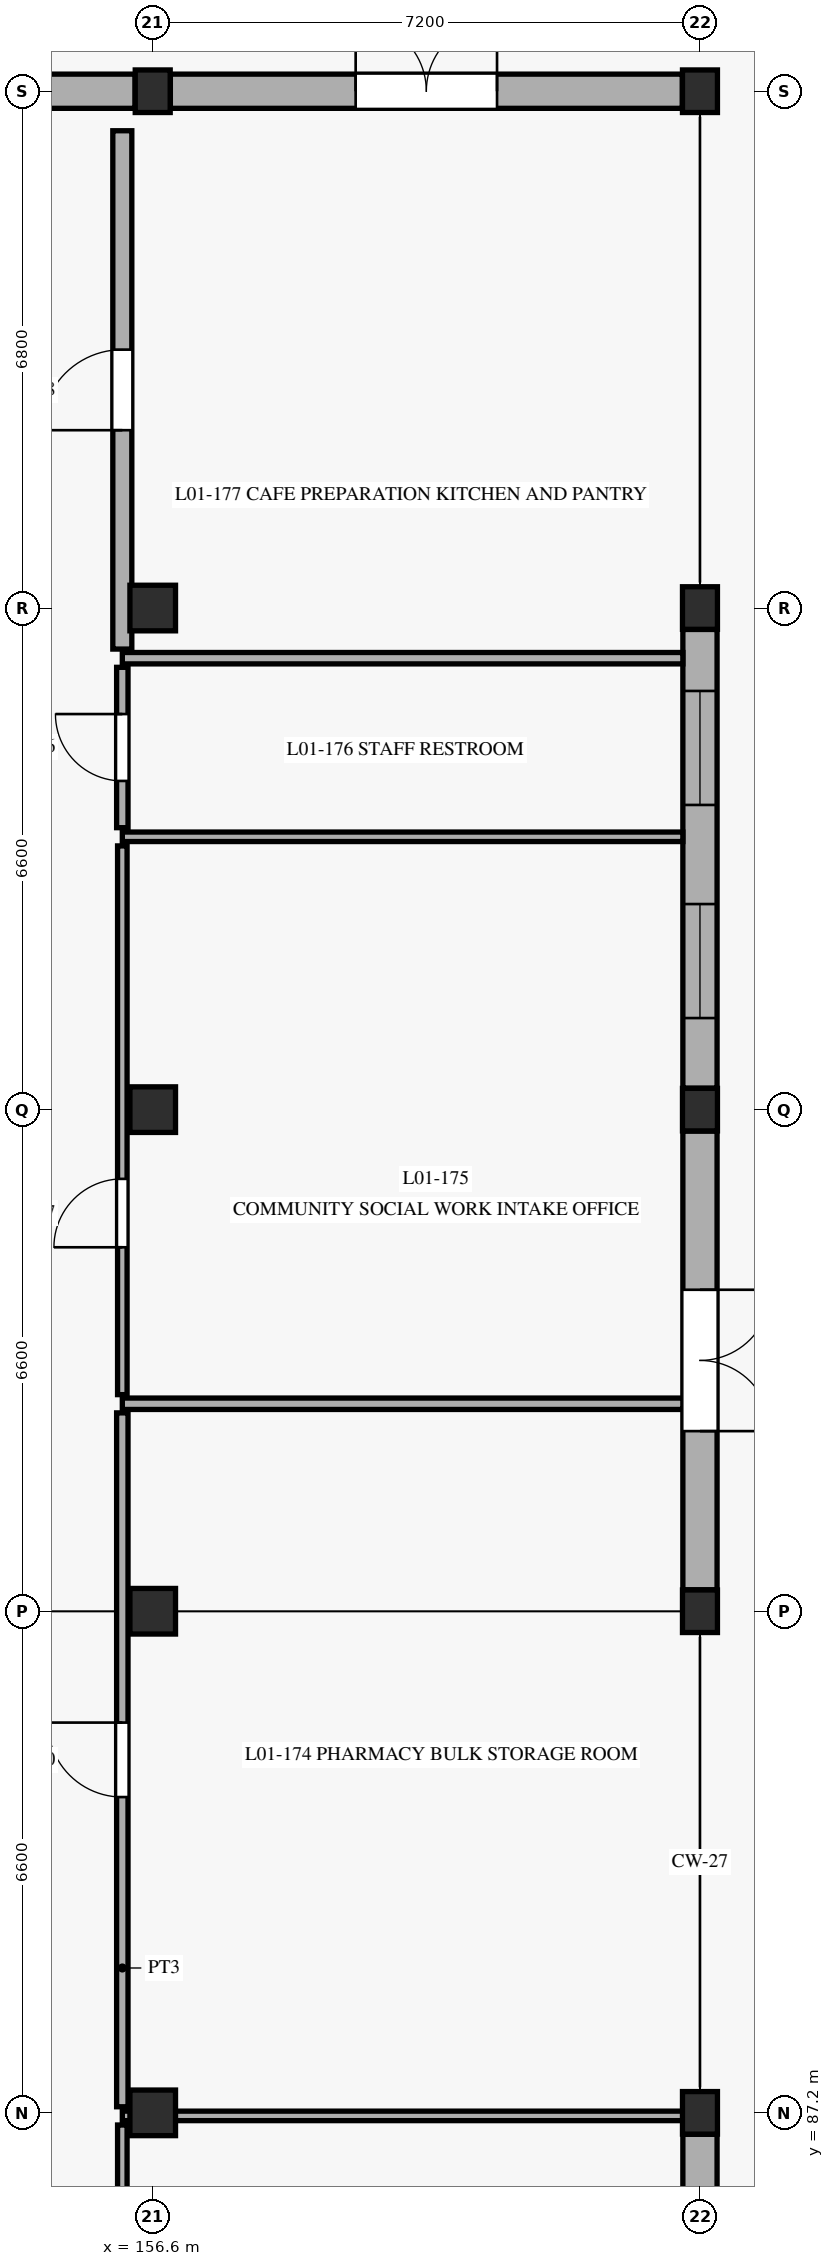
"""IFC4 building model, lengths in metres.
Left out: names, types, materials, properties, quantities, classifications, styles, units other than length and angle.
Written with IfcOpenShell. Run it as: python <this file> out.ifc"""

import sys

from ifc_helpers import new_model, si_unit, direction, frame, frame_2d, origin, origin_with_axes, origin_2d, place, context, subcontext, project, spatial, rectangle, extrude, element, fill, save


model = new_model("IFC4")
c1 = context("Model", 3, precision=1e-05, world=origin(), true_north=direction((0.0, 1.0)))
c2 = subcontext(c1, "Body", "Model", "MODEL_VIEW")
j1 = project(units=[si_unit("LENGTHUNIT", "METRE"), si_unit("PLANEANGLEUNIT", "RADIAN")], contexts=[c1])
p1 = place(None, origin())
s1 = spatial("IfcSite", under=j1, at=p1, CompositionType="ELEMENT")
p2 = place(p1, origin())
s2 = spatial("IfcBuilding", under=s1, at=p2, CompositionType="ELEMENT")
p3 = place(p2, origin())
s3 = spatial("IfcBuildingStorey", under=s2, at=p3, CompositionType="ELEMENT", Elevation=0.0)
for number, where, z_axis, x_axis in (
    (1, (156.6, 87.2, 0.0), (0.0, 0.0, 1.0), (1.0, 0.0, 0.0)),
    (2, (156.6, 93.8, 0.0), (0.0, 0.0, 1.0), (1.0, 0.0, 0.0)),
    (3, (156.6, 100.4, 0.0), (0.0, 0.0, 1.0), (1.0, 0.0, 0.0)),
    (4, (156.6, 107.0, 0.0), (0.0, 0.0, 1.0), (1.0, 0.0, 0.0)),
):
    element("IfcColumn", number, at=place(p3, frame(where, z_axis=z_axis, x_axis=x_axis)), inside=s3, PredefinedType="COLUMN", context=c2, shape_type="SweptSolid", body=[
        extrude(rectangle(XDim=0.6, YDim=0.6, at=origin_2d()), origin(), (0.0, 0.0, 1.0), 4.8),
    ])
for number, where, z_axis, x_axis in (
    (5, (156.6, 113.8, 0.0), (0.0, 0.0, 1.0), (1.0, 0.0, 0.0)),
    (6, (163.8, 87.2, 0.0), (0.0, 0.0, 1.0), (1.0, 0.0, 0.0)),
    (7, (163.8, 93.8, 0.0), (0.0, 0.0, 1.0), (1.0, 0.0, 0.0)),
    (8, (163.8, 100.4, 0.0), (0.0, 0.0, 1.0), (1.0, 0.0, 0.0)),
    (9, (163.8, 107.0, 0.0), (0.0, 0.0, 1.0), (1.0, 0.0, 0.0)),
    (10, (163.8, 113.8, 0.0), (0.0, 0.0, 1.0), (1.0, 0.0, 0.0)),
):
    element("IfcColumn", number, at=place(p3, frame(where, z_axis=z_axis, x_axis=x_axis)), inside=s3, PredefinedType="COLUMN", context=c2, shape_type="SweptSolid", body=[
        extrude(rectangle(XDim=0.46, YDim=0.56, at=origin_2d()), origin(), (0.0, 0.0, 1.0), 4.8),
    ])
p4 = place(p3, frame((163.8, 80.882, 0.0), z_axis=(0.0, 0.0, 1.0), x_axis=(0.0, 1.0, 0.0)))
e11 = element("IfcWall", 11, at=p4, inside=s3, PredefinedType="SOLIDWALL", context=c2, shape_type="SweptSolid", body=[
    extrude(rectangle(XDim=6.036, YDim=0.45, at=frame_2d((3.018, 0.0))), origin(), (0.0, 0.0, 1.0), 3.95),
])
p5 = place(p4, frame((1.262, 0.0, 0.65)))
e12 = element("IfcOpeningElement", 12, at=p5, cuts=e11, PredefinedType="OPENING", context=c2, shape_type="SweptSolid", body=[
    extrude(rectangle(XDim=1.5, YDim=2.2, at=frame_2d((0.75, 1.1))), frame((0.0, 0.235, 0.0), z_axis=(0.0, -1.0, 0.0), x_axis=(1.0, 0.0, 0.0)), (0.0, 0.0, 1.0), 0.47),
])
p6 = place(p4, frame((3.274, 0.0, 0.65)))
e13 = element("IfcOpeningElement", 13, at=p6, cuts=e11, PredefinedType="OPENING", context=c2, shape_type="SweptSolid", body=[
    extrude(rectangle(XDim=1.5, YDim=2.2, at=frame_2d((0.75, 1.1))), frame((0.0, 0.235, 0.0), z_axis=(0.0, -1.0, 0.0), x_axis=(1.0, 0.0, 0.0)), (0.0, 0.0, 1.0), 0.47),
])
p7 = place(p3, frame((163.8, 94.082, 0.0), z_axis=(0.0, 0.0, 1.0), x_axis=(0.0, 1.0, 0.0)))
e14 = element("IfcWall", 14, at=p7, inside=s3, PredefinedType="SOLIDWALL", context=c2, shape_type="SweptSolid", body=[
    extrude(rectangle(XDim=6.036, YDim=0.45, at=frame_2d((3.018, 0.0))), origin(), (0.0, 0.0, 1.0), 3.95),
])
p8 = place(p7, frame((2.088, 0.0, 0.0)))
e15 = element("IfcOpeningElement", 15, at=p8, cuts=e14, PredefinedType="OPENING", context=c2, shape_type="SweptSolid", body=[
    extrude(rectangle(XDim=1.86, YDim=2.5, at=frame_2d((0.93, 1.25))), frame((0.0, 0.235, 0.0), z_axis=(0.0, -1.0, 0.0), x_axis=(1.0, 0.0, 0.0)), (0.0, 0.0, 1.0), 0.47),
])
p9 = place(p3, frame((163.8, 100.682, 0.0), z_axis=(0.0, 0.0, 1.0), x_axis=(0.0, 1.0, 0.0)))
e16 = element("IfcWall", 16, at=p9, inside=s3, PredefinedType="SOLIDWALL", context=c2, shape_type="SweptSolid", body=[
    extrude(rectangle(XDim=6.036, YDim=0.45, at=frame_2d((3.018, 0.0))), origin(), (0.0, 0.0, 1.0), 3.95),
])
p10 = place(p9, frame((0.923, 0.0, 0.65)))
e17 = element("IfcOpeningElement", 17, at=p10, cuts=e16, PredefinedType="OPENING", context=c2, shape_type="SweptSolid", body=[
    extrude(rectangle(XDim=1.5, YDim=2.2, at=frame_2d((0.75, 1.1))), frame((0.0, 0.235, 0.0), z_axis=(0.0, -1.0, 0.0), x_axis=(1.0, 0.0, 0.0)), (0.0, 0.0, 1.0), 0.47),
])
p11 = place(p9, frame((3.727, 0.0, 0.65)))
e18 = element("IfcOpeningElement", 18, at=p11, cuts=e16, PredefinedType="OPENING", context=c2, shape_type="SweptSolid", body=[
    extrude(rectangle(XDim=1.5, YDim=2.2, at=frame_2d((0.75, 1.1))), frame((0.0, 0.235, 0.0), z_axis=(0.0, -1.0, 0.0), x_axis=(1.0, 0.0, 0.0)), (0.0, 0.0, 1.0), 0.47),
])
p12 = place(p3, frame((163.568, 113.8, 0.0), z_axis=(0.0, 0.0, 1.0), x_axis=(-1.0, 0.0, 0.0)))
e19 = element("IfcWall", 19, at=p12, inside=s3, PredefinedType="SOLIDWALL", context=c2, shape_type="SweptSolid", body=[
    extrude(rectangle(XDim=6.736, YDim=0.45, at=frame_2d((3.368, 0.0))), origin(), (0.0, 0.0, 1.0), 4.0),
])
p13 = place(p12, frame((2.438, 0.0, 0.0)))
e20 = element("IfcOpeningElement", 20, at=p13, cuts=e19, PredefinedType="OPENING", context=c2, shape_type="SweptSolid", body=[
    extrude(rectangle(XDim=1.86, YDim=2.5, at=frame_2d((0.93, 1.25))), frame((0.0, 0.235, 0.0), z_axis=(0.0, -1.0, 0.0), x_axis=(1.0, 0.0, 0.0)), (0.0, 0.0, 1.0), 0.47),
])
p14 = place(p3, frame((156.368, 113.8, 0.0), z_axis=(0.0, 0.0, 1.0), x_axis=(-1.0, 0.0, 0.0)))
e21 = element("IfcWall", 21, at=p14, inside=s3, PredefinedType="SOLIDWALL", context=c2, shape_type="SweptSolid", body=[
    extrude(rectangle(XDim=7.336, YDim=0.45, at=frame_2d((3.668, 0.0))), origin(), (0.0, 0.0, 1.0), 4.0),
])
p15 = place(p14, frame((2.568, 0.0, 0.9)))
e22 = element("IfcOpeningElement", 22, at=p15, cuts=e21, PredefinedType="OPENING", context=c2, shape_type="SweptSolid", body=[
    extrude(rectangle(XDim=2.2, YDim=1.1, at=frame_2d((1.1, 0.55))), frame((0.0, 0.235, 0.0), z_axis=(0.0, -1.0, 0.0), x_axis=(1.0, 0.0, 0.0)), (0.0, 0.0, 1.0), 0.47),
])
p16 = place(p3, frame((156.2, 78.79, 0.0), z_axis=(0.0, 0.0, 1.0), x_axis=(0.0, 1.0, 0.0)))
e23 = element("IfcWall", 23, at=p16, inside=s3, PredefinedType="PARTITIONING", context=c2, shape_type="SweptSolid", body=[
    extrude(rectangle(XDim=8.25, YDim=0.125, at=frame_2d((4.125, 0.0))), origin(), (0.0, 0.0, 1.0), 4.095),
])
p17 = place(p16, frame((3.439, 0.0, 0.0)))
e24 = element("IfcOpeningElement", 24, at=p17, cuts=e23, PredefinedType="OPENING", context=c2, shape_type="SweptSolid", body=[
    extrude(rectangle(XDim=1.22, YDim=2.2, at=frame_2d((0.61, 1.1))), frame((0.0, 0.073, 0.0), z_axis=(0.0, -1.0, 0.0), x_axis=(1.0, 0.0, 0.0)), (0.0, 0.0, 1.0), 0.145),
])
p18 = place(p3, frame((156.2, 87.16, 0.0), z_axis=(0.0, 0.0, 1.0), x_axis=(1.0, 0.0, 0.0)))
e25 = element("IfcWall", 25, at=p18, inside=s3, PredefinedType="PARTITIONING", context=c2, shape_type="SweptSolid", body=[
    extrude(rectangle(XDim=7.375, YDim=0.125, at=frame_2d((3.688, 0.0))), origin(), (0.0, 0.0, 1.0), 4.095),
])
p19 = place(p3, frame((156.2, 87.28, 0.0), z_axis=(0.0, 0.0, 1.0), x_axis=(0.0, 1.0, 0.0)))
e26 = element("IfcWall", 26, at=p19, inside=s3, PredefinedType="PARTITIONING", context=c2, shape_type="SweptSolid", body=[
    extrude(rectangle(XDim=9.13, YDim=0.15, at=frame_2d((4.565, 0.0))), origin(), (0.0, 0.0, 1.0), 4.095),
])
p20 = place(p19, frame((4.075, 0.0, 0.0)))
e27 = element("IfcOpeningElement", 27, at=p20, cuts=e26, PredefinedType="OPENING", context=c2, shape_type="SweptSolid", body=[
    extrude(rectangle(XDim=0.98, YDim=2.12, at=frame_2d((0.49, 1.06))), frame((0.0, 0.085, 0.0), z_axis=(0.0, -1.0, 0.0), x_axis=(1.0, 0.0, 0.0)), (0.0, 0.0, 1.0), 0.17),
])
p21 = place(p3, frame((156.2, 96.53, 0.0), z_axis=(0.0, 0.0, 1.0), x_axis=(1.0, 0.0, 0.0)))
e28 = element("IfcWall", 28, at=p21, inside=s3, PredefinedType="PARTITIONING", context=c2, shape_type="SweptSolid", body=[
    extrude(rectangle(XDim=7.375, YDim=0.15, at=frame_2d((3.688, 0.0))), origin(), (0.0, 0.0, 1.0), 3.945),
])
p22 = place(p3, frame((156.2, 96.65, 0.0), z_axis=(0.0, 0.0, 1.0), x_axis=(0.0, 1.0, 0.0)))
e29 = element("IfcWall", 29, at=p22, inside=s3, PredefinedType="PARTITIONING", context=c2, shape_type="SweptSolid", body=[
    extrude(rectangle(XDim=7.22, YDim=0.125, at=frame_2d((3.61, 0.0))), origin(), (0.0, 0.0, 1.0), 4.095),
])
p23 = place(p22, frame((1.939, 0.0, 0.0)))
e30 = element("IfcOpeningElement", 30, at=p23, cuts=e29, PredefinedType="OPENING", context=c2, shape_type="SweptSolid", body=[
    extrude(rectangle(XDim=0.9, YDim=2.12, at=frame_2d((0.45, 1.06))), frame((0.0, 0.073, 0.0), z_axis=(0.0, -1.0, 0.0), x_axis=(1.0, 0.0, 0.0)), (0.0, 0.0, 1.0), 0.145),
])
p24 = place(p3, frame((156.2, 103.99, 0.0), z_axis=(0.0, 0.0, 1.0), x_axis=(1.0, 0.0, 0.0)))
e31 = element("IfcWall", 31, at=p24, inside=s3, PredefinedType="PARTITIONING", context=c2, shape_type="SweptSolid", body=[
    extrude(rectangle(XDim=7.375, YDim=0.125, at=frame_2d((3.688, 0.0))), origin(), (0.0, 0.0, 1.0), 3.945),
])
p25 = place(p3, frame((156.2, 104.11, 0.0), z_axis=(0.0, 0.0, 1.0), x_axis=(0.0, 1.0, 0.0)))
e32 = element("IfcWall", 32, at=p25, inside=s3, PredefinedType="PARTITIONING", context=c2, shape_type="SweptSolid", body=[
    extrude(rectangle(XDim=2.11, YDim=0.15, at=frame_2d((1.055, 0.0))), origin(), (0.0, 0.0, 1.0), 4.495),
])
p26 = place(p25, frame((0.615, 0.0, 0.0)))
e33 = element("IfcOpeningElement", 33, at=p26, cuts=e32, PredefinedType="OPENING", context=c2, shape_type="SweptSolid", body=[
    extrude(rectangle(XDim=0.88, YDim=2.1, at=frame_2d((0.44, 1.05))), frame((0.0, 0.085, 0.0), z_axis=(0.0, -1.0, 0.0), x_axis=(1.0, 0.0, 0.0)), (0.0, 0.0, 1.0), 0.17),
])
p27 = place(p3, frame((156.2, 106.34, 0.0), z_axis=(0.0, 0.0, 1.0), x_axis=(1.0, 0.0, 0.0)))
e34 = element("IfcWall", 34, at=p27, inside=s3, PredefinedType="PARTITIONING", context=c2, shape_type="SweptSolid", body=[
    extrude(rectangle(XDim=7.375, YDim=0.15, at=frame_2d((3.688, 0.0))), origin(), (0.0, 0.0, 1.0), 3.945),
])
p28 = place(p3, frame((156.2, 106.46, 0.0), z_axis=(0.0, 0.0, 1.0), x_axis=(0.0, 1.0, 0.0)))
e35 = element("IfcWall", 35, at=p28, inside=s3, PredefinedType="SOLIDWALL", context=c2, shape_type="SweptSolid", body=[
    extrude(rectangle(XDim=6.82, YDim=0.25, at=frame_2d((3.41, 0.0))), origin(), (0.0, 0.0, 1.0), 4.095),
])
p29 = place(p28, frame((2.88, 0.0, 0.0)))
e36 = element("IfcOpeningElement", 36, at=p29, cuts=e35, PredefinedType="OPENING", context=c2, shape_type="SweptSolid", body=[
    extrude(rectangle(XDim=1.06, YDim=2.2, at=frame_2d((0.53, 1.1))), frame((0.0, 0.135, 0.0), z_axis=(0.0, -1.0, 0.0), x_axis=(1.0, 0.0, 0.0)), (0.0, 0.0, 1.0), 0.27),
])
p30 = place(p8, frame((1.86, 0.0, 0.0), z_axis=(0.0, 0.0, 1.0), x_axis=(-1.0, 0.0, 0.0)))
e37 = element("IfcDoor", 37, at=p30, inside=s3, OperationType="DOUBLE_DOOR_SINGLE_SWING", PredefinedType="DOOR", context=c2, shape_type="SweptSolid", body=[
    extrude(rectangle(XDim=1.86, YDim=2.5, at=frame_2d((0.93, 1.25))), frame((0.0, 0.025, 0.0), z_axis=(0.0, -1.0, 0.0), x_axis=(1.0, 0.0, 0.0)), (0.0, 0.0, 1.0), 0.05),
])
fill(e15, e37)
p31 = place(p10, origin_with_axes())
e38 = element("IfcWindow", 38, at=p31, inside=s3, PartitioningType="SINGLE_PANEL", PredefinedType="WINDOW", context=c2, shape_type="SweptSolid", body=[
    extrude(rectangle(XDim=1.5, YDim=2.2, at=frame_2d((0.75, 1.1))), frame((0.0, 0.03, 0.0), z_axis=(0.0, -1.0, 0.0), x_axis=(1.0, 0.0, 0.0)), (0.0, 0.0, 1.0), 0.06),
])
fill(e17, e38)
p32 = place(p11, origin_with_axes())
e39 = element("IfcWindow", 39, at=p32, inside=s3, PartitioningType="SINGLE_PANEL", PredefinedType="WINDOW", context=c2, shape_type="SweptSolid", body=[
    extrude(rectangle(XDim=1.5, YDim=2.2, at=frame_2d((0.75, 1.1))), frame((0.0, 0.03, 0.0), z_axis=(0.0, -1.0, 0.0), x_axis=(1.0, 0.0, 0.0)), (0.0, 0.0, 1.0), 0.06),
])
fill(e18, e39)
p33 = place(p13, frame((1.86, 0.0, 0.0), z_axis=(0.0, 0.0, 1.0), x_axis=(-1.0, 0.0, 0.0)))
e40 = element("IfcDoor", 40, at=p33, inside=s3, OperationType="DOUBLE_DOOR_SINGLE_SWING", PredefinedType="DOOR", context=c2, shape_type="SweptSolid", body=[
    extrude(rectangle(XDim=1.86, YDim=2.5, at=frame_2d((0.93, 1.25))), frame((0.0, 0.025, 0.0), z_axis=(0.0, -1.0, 0.0), x_axis=(1.0, 0.0, 0.0)), (0.0, 0.0, 1.0), 0.05),
])
fill(e20, e40)
p34 = place(p20, frame((0.98, 0.0, 0.0), z_axis=(0.0, 0.0, 1.0), x_axis=(-1.0, 0.0, 0.0)))
e41 = element("IfcDoor", 41, at=p34, inside=s3, OperationType="SINGLE_SWING_LEFT", PredefinedType="DOOR", context=c2, shape_type="SweptSolid", body=[
    extrude(rectangle(XDim=0.98, YDim=2.12, at=frame_2d((0.49, 1.06))), frame((0.0, 0.025, 0.0), z_axis=(0.0, -1.0, 0.0), x_axis=(1.0, 0.0, 0.0)), (0.0, 0.0, 1.0), 0.05),
])
fill(e27, e41)
p35 = place(p23, frame((0.9, 0.0, 0.0), z_axis=(0.0, 0.0, 1.0), x_axis=(-1.0, 0.0, 0.0)))
e42 = element("IfcDoor", 42, at=p35, inside=s3, OperationType="SINGLE_SWING_RIGHT", PredefinedType="DOOR", context=c2, shape_type="SweptSolid", body=[
    extrude(rectangle(XDim=0.9, YDim=2.12, at=frame_2d((0.45, 1.06))), frame((0.0, 0.025, 0.0), z_axis=(0.0, -1.0, 0.0), x_axis=(1.0, 0.0, 0.0)), (0.0, 0.0, 1.0), 0.05),
])
fill(e30, e42)
p36 = place(p26, frame((0.88, 0.0, 0.0), z_axis=(0.0, 0.0, 1.0), x_axis=(-1.0, 0.0, 0.0)))
e43 = element("IfcDoor", 43, at=p36, inside=s3, OperationType="SINGLE_SWING_LEFT", PredefinedType="DOOR", context=c2, shape_type="SweptSolid", body=[
    extrude(rectangle(XDim=0.88, YDim=2.1, at=frame_2d((0.44, 1.05))), frame((0.0, 0.025, 0.0), z_axis=(0.0, -1.0, 0.0), x_axis=(1.0, 0.0, 0.0)), (0.0, 0.0, 1.0), 0.05),
])
fill(e33, e43)
p37 = place(p29, frame((1.06, 0.0, 0.0), z_axis=(0.0, 0.0, 1.0), x_axis=(-1.0, 0.0, 0.0)))
e44 = element("IfcDoor", 44, at=p37, inside=s3, OperationType="SINGLE_SWING_RIGHT", PredefinedType="DOOR", context=c2, shape_type="SweptSolid", body=[
    extrude(rectangle(XDim=1.06, YDim=2.2, at=frame_2d((0.53, 1.1))), frame((0.0, 0.025, 0.0), z_axis=(0.0, -1.0, 0.0), x_axis=(1.0, 0.0, 0.0)), (0.0, 0.0, 1.0), 0.05),
])
fill(e36, e44)
save(model, sys.argv[1])
